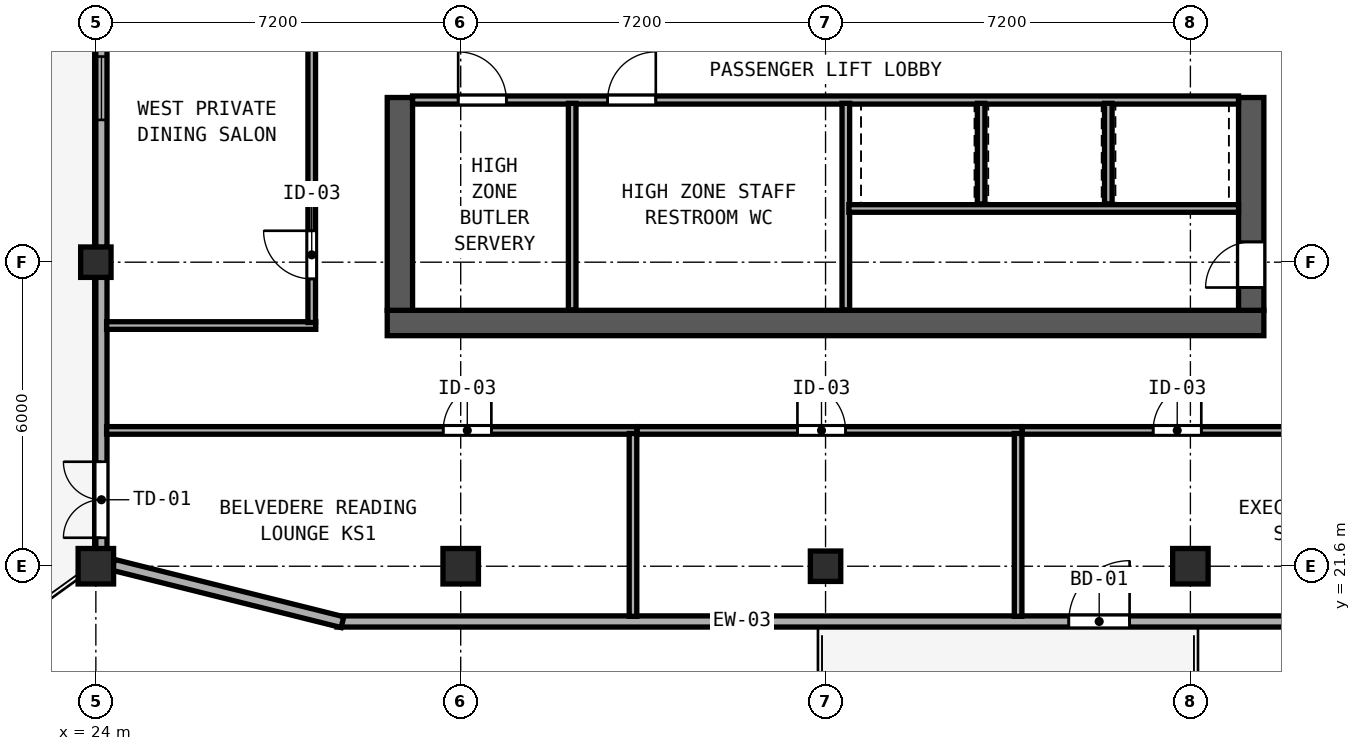
"""IFC4 building model, lengths in metres.
Left out: names, types, materials, properties, quantities, classifications, styles, units other than length and angle.
Written with IfcOpenShell. Run it as: python <this file> out.ifc"""

import sys

from ifc_helpers import new_model, si_unit, direction, frame, frame_2d, origin, origin_2d, place, context, subcontext, project, spatial, rectangle, hollow_rectangle, extrude, element, fill, save


model = new_model("IFC4")
c1 = context("Model", 3, precision=1e-05, world=origin(), true_north=direction((0.0, 1.0)))
c2 = subcontext(c1, "Body", "Model", "MODEL_VIEW")
j1 = project(units=[si_unit("LENGTHUNIT", "METRE"), si_unit("PLANEANGLEUNIT", "RADIAN")], contexts=[c1])
p1 = place(None, origin())
s1 = spatial("IfcSite", under=j1, at=p1, CompositionType="ELEMENT")
p2 = place(p1, origin())
s2 = spatial("IfcBuilding", under=s1, at=p2, CompositionType="ELEMENT")
p3 = place(p2, frame((0.0, 0.0, 282.2)))
s3 = spatial("IfcBuildingStorey", under=s2, at=p3, CompositionType="ELEMENT", Elevation=282.2)
p4 = place(p3, frame((29.75, 26.4, 0.0), z_axis=(0.0, 0.0, 1.0), x_axis=(1.0, 0.0, 0.0)))
e1 = element("IfcWall", 1, at=p4, inside=s3, PredefinedType="SHEAR", context=c2, shape_type="SweptSolid", body=[
    extrude(rectangle(XDim=17.3, YDim=0.5, at=frame_2d((8.65, 0.0))), origin(), (0.0, 0.0, 1.0), 3.72),
])
p5 = place(p3, frame((30.0, 26.65, 0.0), z_axis=(0.0, 0.0, 1.0), x_axis=(0.0, 1.0, 0.0)))
e2 = element("IfcWall", 2, at=p5, inside=s3, PredefinedType="SHEAR", context=c2, shape_type="SweptSolid", body=[
    extrude(rectangle(XDim=4.2, YDim=0.5, at=frame_2d((2.1, 0.0))), origin(), (0.0, 0.0, 1.0), 3.72),
])
p6 = place(p3, frame((46.8, 26.65, 0.0), z_axis=(0.0, 0.0, 1.0), x_axis=(0.0, 1.0, 0.0)))
e3 = element("IfcWall", 3, at=p6, inside=s3, PredefinedType="SHEAR", context=c2, shape_type="SweptSolid", body=[
    extrude(rectangle(XDim=4.2, YDim=0.5, at=frame_2d((2.1, 0.0))), origin(), (0.0, 0.0, 1.0), 3.72),
])
p7 = place(p6, frame((1.35, 0.0, 0.0), z_axis=(0.0, 0.0, 1.0), x_axis=(-1.0, 0.0, 0.0)))
e4 = element("IfcOpeningElement", 4, at=p7, cuts=e3, PredefinedType="OPENING", context=c2, shape_type="SweptSolid", body=[
    extrude(rectangle(XDim=0.9, YDim=2.1, at=frame_2d((0.45, 1.05))), frame((0.0, 0.26, 0.0), z_axis=(0.0, -1.0, 0.0), x_axis=(1.0, 0.0, 0.0)), (0.0, 0.0, 1.0), 0.52),
])
for number, where, z_axis, x_axis in (
    (5, (24.0, 21.6, 0.0), (0.0, 0.0, 1.0), (1.0, 0.0, 0.0)),
    (6, (31.2, 21.6, 0.0), (0.0, 0.0, 1.0), (1.0, 0.0, 0.0)),
    (7, (45.6, 21.6, 0.0), (0.0, 0.0, 1.0), (1.0, 0.0, 0.0)),
):
    element("IfcColumn", number, at=place(p3, frame(where, z_axis=z_axis, x_axis=x_axis)), inside=s3, PredefinedType="COLUMN", context=c2, shape_type="SweptSolid", body=[
        extrude(hollow_rectangle(XDim=0.7, YDim=0.7, WallThickness=0.026, at=origin_2d()), origin(), (0.0, 0.0, 1.0), 3.9),
    ])
for number, where, z_axis, x_axis in (
    (8, (24.0, 27.6, 0.0), (0.0, 0.0, 1.0), (1.0, 0.0, 0.0)),
    (9, (38.4, 21.6, 0.0), (0.0, 0.0, 1.0), (1.0, 0.0, 0.0)),
):
    element("IfcColumn", number, at=place(p3, frame(where, z_axis=z_axis, x_axis=x_axis)), inside=s3, PredefinedType="COLUMN", context=c2, shape_type="SweptSolid", body=[
        extrude(hollow_rectangle(XDim=0.6, YDim=0.6, WallThickness=0.024, at=origin_2d()), origin(), (0.0, 0.0, 1.0), 3.9),
    ])
p8 = place(p3, frame((28.759, 20.51, 0.0), z_axis=(0.0, 0.0, 1.0), x_axis=(1.0, 0.0, 0.0)))
e10 = element("IfcWall", 10, at=p8, inside=s3, PredefinedType="SOLIDWALL", context=c2, shape_type="SweptSolid", body=[
    extrude(rectangle(XDim=19.283, YDim=0.22, at=frame_2d((9.642, 0.0))), origin(), (0.0, 0.0, 1.0), 3.72),
])
p9 = place(p8, frame((15.641, 0.0, 0.0), z_axis=(0.0, 0.0, 1.0), x_axis=(-1.0, 0.0, 0.0)))
e11 = element("IfcOpeningElement", 11, at=p9, cuts=e10, PredefinedType="OPENING", context=c2, shape_type="SweptSolid", body=[
    extrude(rectangle(XDim=1.2, YDim=2.15, at=frame_2d((0.6, 1.075))), frame((0.0, 0.12, 0.0), z_axis=(0.0, -1.0, 0.0), x_axis=(1.0, 0.0, 0.0)), (0.0, 0.0, 1.0), 0.24),
])
p10 = place(p3, frame((24.11, 33.258, 0.0), z_axis=(0.0, 0.0, 1.0), x_axis=(0.0, -1.0, 0.0)))
e12 = element("IfcWall", 12, at=p10, inside=s3, PredefinedType="SOLIDWALL", context=c2, shape_type="SweptSolid", body=[
    extrude(rectangle(XDim=5.366, YDim=0.22, at=frame_2d((2.683, 0.0))), origin(), (0.0, 0.0, 1.0), 3.365),
])
p11 = place(p10, frame((1.6, 0.0, 0.85)))
e13 = element("IfcOpeningElement", 13, at=p11, cuts=e12, PredefinedType="OPENING", context=c2, shape_type="SweptSolid", body=[
    extrude(rectangle(XDim=1.25, YDim=1.95, at=frame_2d((0.625, 0.975))), frame((0.0, 0.12, 0.0), z_axis=(0.0, -1.0, 0.0), x_axis=(1.0, 0.0, 0.0)), (0.0, 0.0, 1.0), 0.24),
])
p12 = place(p3, frame((24.11, 27.308, 0.0), z_axis=(0.0, 0.0, 1.0), x_axis=(0.0, -1.0, 0.0)))
e14 = element("IfcWall", 14, at=p12, inside=s3, PredefinedType="SOLIDWALL", context=c2, shape_type="SweptSolid", body=[
    extrude(rectangle(XDim=5.366, YDim=0.22, at=frame_2d((2.683, 0.0))), origin(), (0.0, 0.0, 1.0), 3.365),
])
p13 = place(p12, frame((5.146, 0.0, 0.0), z_axis=(0.0, 0.0, 1.0), x_axis=(-1.0, 0.0, 0.0)))
e15 = element("IfcOpeningElement", 15, at=p13, cuts=e14, PredefinedType="OPENING", context=c2, shape_type="SweptSolid", body=[
    extrude(rectangle(XDim=1.5, YDim=2.2, at=frame_2d((0.75, 1.1))), frame((0.0, 0.12, 0.0), z_axis=(0.0, -1.0, 0.0), x_axis=(1.0, 0.0, 0.0)), (0.0, 0.0, 1.0), 0.24),
])
p14 = place(p3, frame((24.342, 21.628, 0.0), z_axis=(0.0, 0.0, 1.0), x_axis=(0.970136341762, -0.242560257242, 0.0)))
e16 = element("IfcWall", 16, at=p14, inside=s3, PredefinedType="SOLIDWALL", context=c2, shape_type="SweptSolid", body=[
    extrude(rectangle(XDim=4.664, YDim=0.22, at=frame_2d((2.332, 0.0))), origin(), (0.0, 0.0, 1.0), 3.365),
])
p15 = place(p3, frame((30.25, 30.8, 0.0), z_axis=(0.0, 0.0, 1.0), x_axis=(1.0, 0.0, 0.0)))
e17 = element("IfcWall", 17, at=p15, inside=s3, PredefinedType="SOLIDWALL", context=c2, shape_type="SweptSolid", body=[
    extrude(rectangle(XDim=16.3, YDim=0.16, at=frame_2d((8.15, 0.0))), origin(), (0.0, 0.0, 1.0), 3.72),
])
p16 = place(p15, frame((0.9, 0.0, 0.0)))
e18 = element("IfcOpeningElement", 18, at=p16, cuts=e17, PredefinedType="OPENING", context=c2, shape_type="SweptSolid", body=[
    extrude(rectangle(XDim=0.95, YDim=2.12, at=frame_2d((0.475, 1.06))), frame((0.0, 0.09, 0.0), z_axis=(0.0, -1.0, 0.0), x_axis=(1.0, 0.0, 0.0)), (0.0, 0.0, 1.0), 0.18),
])
p17 = place(p15, frame((3.85, 0.0, 0.0)))
e19 = element("IfcOpeningElement", 19, at=p17, cuts=e17, PredefinedType="OPENING", context=c2, shape_type="SweptSolid", body=[
    extrude(rectangle(XDim=0.95, YDim=2.12, at=frame_2d((0.475, 1.06))), frame((0.0, 0.09, 0.0), z_axis=(0.0, -1.0, 0.0), x_axis=(1.0, 0.0, 0.0)), (0.0, 0.0, 1.0), 0.18),
])
p18 = place(p3, frame((38.8, 26.66, 0.0), z_axis=(0.0, 0.0, 1.0), x_axis=(0.0, 1.0, 0.0)))
e20 = element("IfcWall", 20, at=p18, inside=s3, PredefinedType="SOLIDWALL", context=c2, shape_type="SweptSolid", body=[
    extrude(rectangle(XDim=4.075, YDim=0.15, at=frame_2d((2.038, 0.0))), origin(), (0.0, 0.0, 1.0), 3.72),
])
p19 = place(p3, frame((33.4, 26.66, 0.0), z_axis=(0.0, 0.0, 1.0), x_axis=(0.0, 1.0, 0.0)))
e21 = element("IfcWall", 21, at=p19, inside=s3, PredefinedType="PARTITIONING", context=c2, shape_type="SweptSolid", body=[
    extrude(rectangle(XDim=4.075, YDim=0.15, at=frame_2d((2.038, 0.0))), origin(), (0.0, 0.0, 1.0), 3.72),
])
p20 = place(p3, frame((38.86, 28.66, 0.0), z_axis=(0.0, 0.0, 1.0), x_axis=(1.0, 0.0, 0.0)))
e22 = element("IfcWall", 22, at=p20, inside=s3, PredefinedType="PARTITIONING", context=c2, shape_type="SweptSolid", body=[
    extrude(rectangle(XDim=7.69, YDim=0.15, at=frame_2d((3.845, 0.0))), origin(), (0.0, 0.0, 1.0), 3.72),
])
for number, where, z_axis, x_axis in (
    (23, (41.47, 28.75, 0.0), (0.0, 0.0, 1.0), (0.0, 1.0, 0.0)),
    (24, (43.98, 28.75, 0.0), (0.0, 0.0, 1.0), (0.0, 1.0, 0.0)),
):
    element("IfcWall", number, at=place(p3, frame(where, z_axis=z_axis, x_axis=x_axis)), inside=s3, PredefinedType="SOLIDWALL", context=c2, shape_type="SweptSolid", body=[
        extrude(rectangle(XDim=1.985, YDim=0.15, at=frame_2d((0.993, 0.0))), origin(), (0.0, 0.0, 1.0), 3.72),
    ])
p21 = place(p3, frame((24.212, 26.35, 0.0), z_axis=(0.0, 0.0, 1.0), x_axis=(1.0, 0.0, 0.0)))
e25 = element("IfcWall", 25, at=p21, inside=s3, PredefinedType="PARTITIONING", context=c2, shape_type="SweptSolid", body=[
    extrude(rectangle(XDim=4.128, YDim=0.15, at=frame_2d((2.064, 0.0))), origin(), (0.0, 0.0, 1.0), 3.72),
])
p22 = place(p3, frame((28.26, 26.41, 0.0), z_axis=(0.0, 0.0, 1.0), x_axis=(0.0, 1.0, 0.0)))
e26 = element("IfcWall", 26, at=p22, inside=s3, PredefinedType="PARTITIONING", context=c2, shape_type="SweptSolid", body=[
    extrude(rectangle(XDim=6.37, YDim=0.15, at=frame_2d((3.185, 0.0))), origin(), (0.0, 0.0, 1.0), 3.72),
])
p23 = place(p22, frame((1.81, 0.0, 0.0), z_axis=(0.0, 0.0, 1.0), x_axis=(-1.0, 0.0, 0.0)))
e27 = element("IfcOpeningElement", 27, at=p23, cuts=e26, PredefinedType="OPENING", context=c2, shape_type="SweptSolid", body=[
    extrude(rectangle(XDim=0.95, YDim=2.12, at=frame_2d((0.475, 1.06))), frame((0.0, 0.085, 0.0), z_axis=(0.0, -1.0, 0.0), x_axis=(1.0, 0.0, 0.0)), (0.0, 0.0, 1.0), 0.17),
])
p24 = place(p3, frame((24.212, 24.28, 0.0), z_axis=(0.0, 0.0, 1.0), x_axis=(1.0, 0.0, 0.0)))
e28 = element("IfcWall", 28, at=p24, inside=s3, PredefinedType="PARTITIONING", context=c2, shape_type="SweptSolid", body=[
    extrude(rectangle(XDim=10.468, YDim=0.15, at=frame_2d((5.234, 0.0))), origin(), (0.0, 0.0, 1.0), 3.72),
])
p25 = place(p24, frame((7.593, 0.0, 0.0), z_axis=(0.0, 0.0, 1.0), x_axis=(-1.0, 0.0, 0.0)))
e29 = element("IfcOpeningElement", 29, at=p25, cuts=e28, PredefinedType="OPENING", context=c2, shape_type="SweptSolid", body=[
    extrude(rectangle(XDim=0.95, YDim=2.12, at=frame_2d((0.475, 1.06))), frame((0.0, 0.085, 0.0), z_axis=(0.0, -1.0, 0.0), x_axis=(1.0, 0.0, 0.0)), (0.0, 0.0, 1.0), 0.17),
])
p26 = place(p3, frame((34.6, 20.612, 0.0), z_axis=(0.0, 0.0, 1.0), x_axis=(0.0, 1.0, 0.0)))
e30 = element("IfcWall", 30, at=p26, inside=s3, PredefinedType="PARTITIONING", context=c2, shape_type="SweptSolid", body=[
    extrude(rectangle(XDim=3.608, YDim=0.15, at=frame_2d((1.804, 0.0))), origin(), (0.0, 0.0, 1.0), 3.72),
])
p27 = place(p3, frame((34.682, 24.28, 0.0), z_axis=(0.0, 0.0, 1.0), x_axis=(1.0, 0.0, 0.0)))
e31 = element("IfcWall", 31, at=p27, inside=s3, PredefinedType="PARTITIONING", context=c2, shape_type="SweptSolid", body=[
    extrude(rectangle(XDim=7.598, YDim=0.15, at=frame_2d((3.799, 0.0))), origin(), (0.0, 0.0, 1.0), 3.72),
])
p28 = place(p27, frame((4.113, 0.0, 0.0), z_axis=(0.0, 0.0, 1.0), x_axis=(-1.0, 0.0, 0.0)))
e32 = element("IfcOpeningElement", 32, at=p28, cuts=e31, PredefinedType="OPENING", context=c2, shape_type="SweptSolid", body=[
    extrude(rectangle(XDim=0.95, YDim=2.12, at=frame_2d((0.475, 1.06))), frame((0.0, 0.085, 0.0), z_axis=(0.0, -1.0, 0.0), x_axis=(1.0, 0.0, 0.0)), (0.0, 0.0, 1.0), 0.17),
])
p29 = place(p3, frame((42.2, 20.612, 0.0), z_axis=(0.0, 0.0, 1.0), x_axis=(0.0, 1.0, 0.0)))
e33 = element("IfcWall", 33, at=p29, inside=s3, PredefinedType="PARTITIONING", context=c2, shape_type="SweptSolid", body=[
    extrude(rectangle(XDim=3.608, YDim=0.15, at=frame_2d((1.804, 0.0))), origin(), (0.0, 0.0, 1.0), 3.72),
])
p30 = place(p3, frame((42.282, 24.28, 0.0), z_axis=(0.0, 0.0, 1.0), x_axis=(1.0, 0.0, 0.0)))
e34 = element("IfcWall", 34, at=p30, inside=s3, PredefinedType="PARTITIONING", context=c2, shape_type="SweptSolid", body=[
    extrude(rectangle(XDim=10.306, YDim=0.15, at=frame_2d((5.153, 0.0))), origin(), (0.0, 0.0, 1.0), 3.72),
])
p31 = place(p30, frame((3.533, 0.0, 0.0), z_axis=(0.0, 0.0, 1.0), x_axis=(-1.0, 0.0, 0.0)))
e35 = element("IfcOpeningElement", 35, at=p31, cuts=e34, PredefinedType="OPENING", context=c2, shape_type="SweptSolid", body=[
    extrude(rectangle(XDim=0.95, YDim=2.12, at=frame_2d((0.475, 1.06))), frame((0.0, 0.085, 0.0), z_axis=(0.0, -1.0, 0.0), x_axis=(1.0, 0.0, 0.0)), (0.0, 0.0, 1.0), 0.17),
])
p32 = place(p11, origin())
e36 = element("IfcWindow", 36, at=p32, inside=s3, PartitioningType="SINGLE_PANEL", PredefinedType="WINDOW", context=c2, shape_type="SweptSolid", body=[
    extrude(rectangle(XDim=1.25, YDim=1.95, at=frame_2d((0.625, 0.975))), frame((0.0, 0.03, 0.0), z_axis=(0.0, -1.0, 0.0), x_axis=(1.0, 0.0, 0.0)), (0.0, 0.0, 1.0), 0.06),
])
fill(e13, e36)
p33 = place(p13, origin())
e37 = element("IfcDoor", 37, at=p33, inside=s3, OperationType="DOUBLE_DOOR_SINGLE_SWING", PredefinedType="DOOR", context=c2, shape_type="SweptSolid", body=[
    extrude(rectangle(XDim=1.5, YDim=2.2, at=frame_2d((0.75, 1.1))), frame((0.0, 0.025, 0.0), z_axis=(0.0, -1.0, 0.0), x_axis=(1.0, 0.0, 0.0)), (0.0, 0.0, 1.0), 0.05),
])
fill(e15, e37)
p34 = place(p9, origin())
e38 = element("IfcDoor", 38, at=p34, inside=s3, OperationType="SINGLE_SWING_LEFT", PredefinedType="DOOR", context=c2, shape_type="SweptSolid", body=[
    extrude(rectangle(XDim=1.2, YDim=2.15, at=frame_2d((0.6, 1.075))), frame((0.0, 0.025, 0.0), z_axis=(0.0, -1.0, 0.0), x_axis=(1.0, 0.0, 0.0)), (0.0, 0.0, 1.0), 0.05),
])
fill(e11, e38)
p35 = place(p16, origin())
e39 = element("IfcDoor", 39, at=p35, inside=s3, OperationType="SINGLE_SWING_LEFT", PredefinedType="DOOR", context=c2, shape_type="SweptSolid", body=[
    extrude(rectangle(XDim=0.95, YDim=2.12, at=frame_2d((0.475, 1.06))), frame((0.0, 0.025, 0.0), z_axis=(0.0, -1.0, 0.0), x_axis=(1.0, 0.0, 0.0)), (0.0, 0.0, 1.0), 0.05),
])
fill(e18, e39)
p36 = place(p17, origin())
e40 = element("IfcDoor", 40, at=p36, inside=s3, OperationType="SINGLE_SWING_RIGHT", PredefinedType="DOOR", context=c2, shape_type="SweptSolid", body=[
    extrude(rectangle(XDim=0.95, YDim=2.12, at=frame_2d((0.475, 1.06))), frame((0.0, 0.025, 0.0), z_axis=(0.0, -1.0, 0.0), x_axis=(1.0, 0.0, 0.0)), (0.0, 0.0, 1.0), 0.05),
])
fill(e19, e40)
p37 = place(p7, origin())
e41 = element("IfcDoor", 41, at=p37, inside=s3, OperationType="SINGLE_SWING_RIGHT", PredefinedType="DOOR", context=c2, shape_type="SweptSolid", body=[
    extrude(rectangle(XDim=0.9, YDim=2.1, at=frame_2d((0.45, 1.05))), frame((0.0, -0.135, 0.0), z_axis=(0.0, -1.0, 0.0), x_axis=(1.0, 0.0, 0.0)), (0.0, 0.0, 1.0), 0.05),
])
fill(e4, e41)
p38 = place(p23, origin())
e42 = element("IfcDoor", 42, at=p38, inside=s3, OperationType="SINGLE_SWING_LEFT", PredefinedType="DOOR", context=c2, shape_type="SweptSolid", body=[
    extrude(rectangle(XDim=0.95, YDim=2.12, at=frame_2d((0.475, 1.06))), frame((0.0, 0.025, 0.0), z_axis=(0.0, -1.0, 0.0), x_axis=(1.0, 0.0, 0.0)), (0.0, 0.0, 1.0), 0.05),
])
fill(e27, e42)
p39 = place(p25, origin())
e43 = element("IfcDoor", 43, at=p39, inside=s3, OperationType="SINGLE_SWING_LEFT", PredefinedType="DOOR", context=c2, shape_type="SweptSolid", body=[
    extrude(rectangle(XDim=0.95, YDim=2.12, at=frame_2d((0.475, 1.06))), frame((0.0, 0.025, 0.0), z_axis=(0.0, -1.0, 0.0), x_axis=(1.0, 0.0, 0.0)), (0.0, 0.0, 1.0), 0.05),
])
fill(e29, e43)
p40 = place(p28, origin())
e44 = element("IfcDoor", 44, at=p40, inside=s3, OperationType="SINGLE_SWING_RIGHT", PredefinedType="DOOR", context=c2, shape_type="SweptSolid", body=[
    extrude(rectangle(XDim=0.95, YDim=2.12, at=frame_2d((0.475, 1.06))), frame((0.0, 0.025, 0.0), z_axis=(0.0, -1.0, 0.0), x_axis=(1.0, 0.0, 0.0)), (0.0, 0.0, 1.0), 0.05),
])
fill(e32, e44)
p41 = place(p31, origin())
e45 = element("IfcDoor", 45, at=p41, inside=s3, OperationType="SINGLE_SWING_LEFT", PredefinedType="DOOR", context=c2, shape_type="SweptSolid", body=[
    extrude(rectangle(XDim=0.95, YDim=2.12, at=frame_2d((0.475, 1.06))), frame((0.0, 0.025, 0.0), z_axis=(0.0, -1.0, 0.0), x_axis=(1.0, 0.0, 0.0)), (0.0, 0.0, 1.0), 0.05),
])
fill(e35, e45)
save(model, sys.argv[1])
